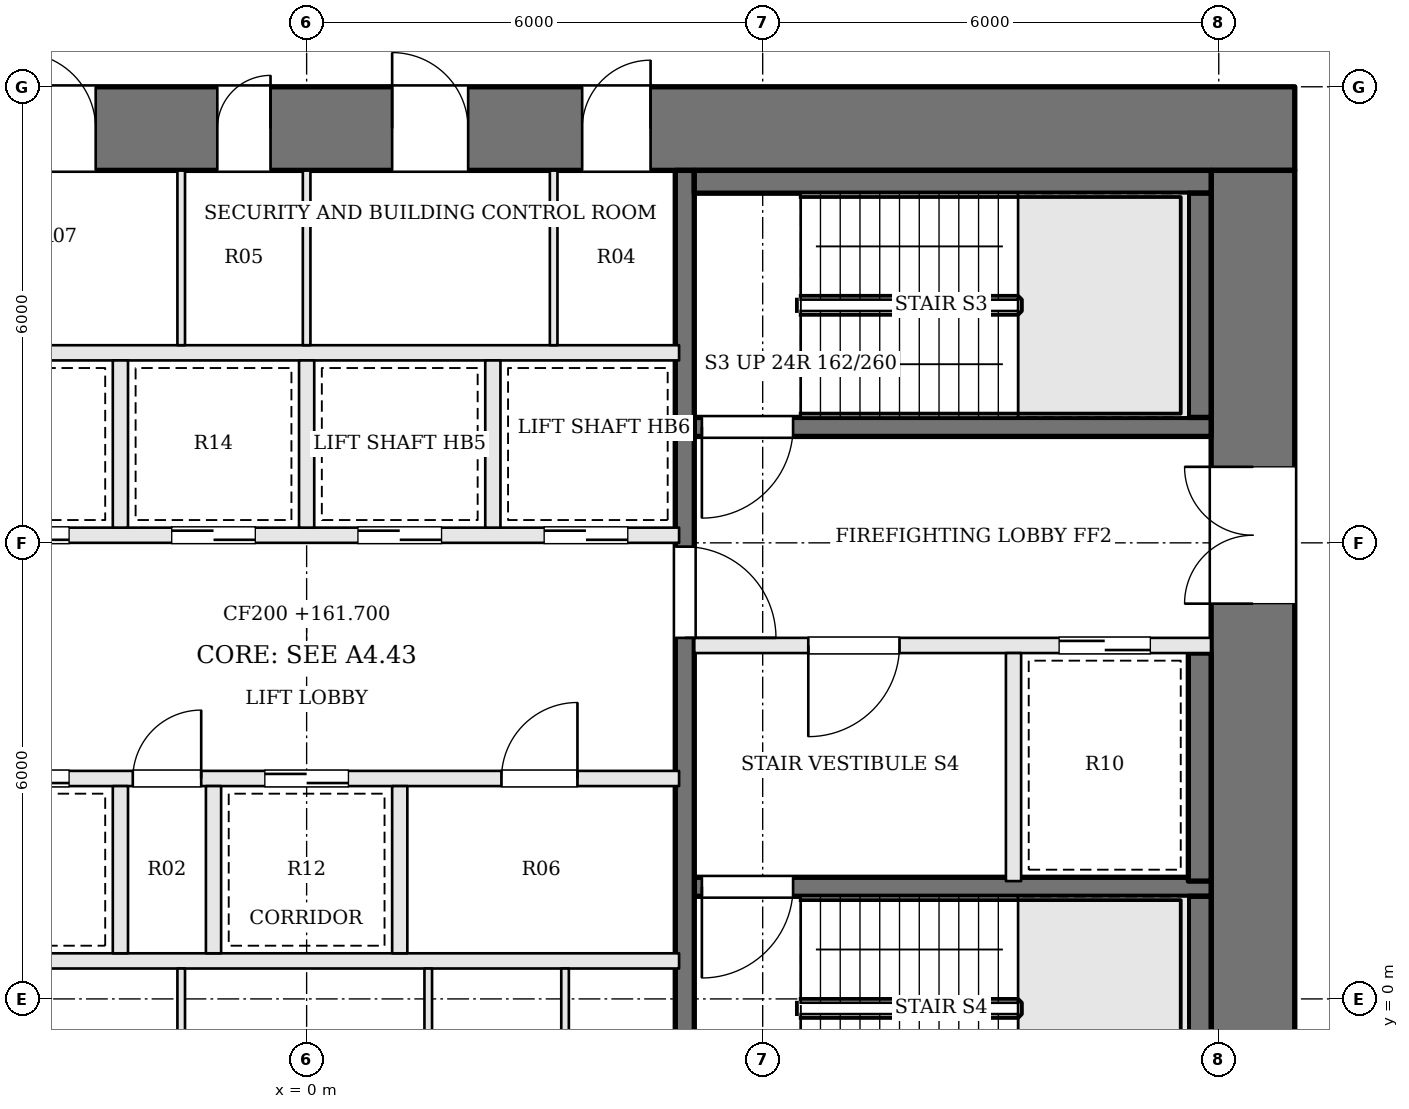
"""IFC4 building model, lengths in metres.
Left out: names, types, materials, properties, quantities, classifications, styles, units other than length and angle.
Written with IfcOpenShell. Run it as: python <this file> out.ifc"""

import sys

from ifc_helpers import new_model, si_unit, direction, frame, frame_2d, origin, place, context, subcontext, project, spatial, rectangle, extrude, element, fill, save


model = new_model("IFC4")
c1 = context("Model", 3, precision=1e-05, world=origin(), true_north=direction((0.0, 1.0)))
c2 = subcontext(c1, "Body", "Model", "MODEL_VIEW")
j1 = project(units=[si_unit("LENGTHUNIT", "METRE"), si_unit("PLANEANGLEUNIT", "RADIAN")], contexts=[c1])
p1 = place(None, origin())
s1 = spatial("IfcSite", under=j1, at=p1, CompositionType="ELEMENT")
p2 = place(p1, origin())
s2 = spatial("IfcBuilding", under=s1, at=p2, CompositionType="ELEMENT")
p3 = place(p2, frame((0.0, 0.0, 161.7)))
s3 = spatial("IfcBuildingStorey", under=s2, at=p3, CompositionType="ELEMENT", Elevation=161.7)
p4 = place(p3, frame((-13.0, 11.45, 0.0), z_axis=(0.0, 0.0, 1.0), x_axis=(1.0, 0.0, 0.0)))
e1 = element("IfcWall", 1, at=p4, inside=s3, PredefinedType="SHEAR", context=c2, shape_type="SweptSolid", body=[
    extrude(rectangle(XDim=26.0, YDim=1.1, at=frame_2d((13.0, 0.0))), origin(), (0.0, 0.0, 1.0), 3.9),
])
p5 = place(p4, frame((9.225, 0.0, 0.0)))
e2 = element("IfcOpeningElement", 2, at=p5, cuts=e1, PredefinedType="OPENING", context=c2, shape_type="SweptSolid", body=[
    extrude(rectangle(XDim=1.0, YDim=2.1, at=frame_2d((0.5, 1.05))), frame((0.0, 0.56, 0.0), z_axis=(0.0, -1.0, 0.0), x_axis=(1.0, 0.0, 0.0)), (0.0, 0.0, 1.0), 1.12),
])
p6 = place(p4, frame((11.825, 0.0, 0.0)))
e3 = element("IfcOpeningElement", 3, at=p6, cuts=e1, PredefinedType="OPENING", context=c2, shape_type="SweptSolid", body=[
    extrude(rectangle(XDim=0.7, YDim=2.1, at=frame_2d((0.35, 1.05))), frame((0.0, 0.56, 0.0), z_axis=(0.0, -1.0, 0.0), x_axis=(1.0, 0.0, 0.0)), (0.0, 0.0, 1.0), 1.12),
])
p7 = place(p4, frame((14.125, 0.0, 0.0)))
e4 = element("IfcOpeningElement", 4, at=p7, cuts=e1, PredefinedType="OPENING", context=c2, shape_type="SweptSolid", body=[
    extrude(rectangle(XDim=1.0, YDim=2.1, at=frame_2d((0.5, 1.05))), frame((0.0, 0.56, 0.0), z_axis=(0.0, -1.0, 0.0), x_axis=(1.0, 0.0, 0.0)), (0.0, 0.0, 1.0), 1.12),
])
p8 = place(p4, frame((16.625, 0.0, 0.0)))
e5 = element("IfcOpeningElement", 5, at=p8, cuts=e1, PredefinedType="OPENING", context=c2, shape_type="SweptSolid", body=[
    extrude(rectangle(XDim=0.9, YDim=2.1, at=frame_2d((0.45, 1.05))), frame((0.0, 0.56, 0.0), z_axis=(0.0, -1.0, 0.0), x_axis=(1.0, 0.0, 0.0)), (0.0, 0.0, 1.0), 1.12),
])
p9 = place(p3, frame((12.45, -1.9, 0.0), z_axis=(0.0, 0.0, 1.0), x_axis=(0.0, 1.0, 0.0)))
e6 = element("IfcWall", 6, at=p9, inside=s3, PredefinedType="SHEAR", context=c2, shape_type="SweptSolid", body=[
    extrude(rectangle(XDim=12.8, YDim=1.1, at=frame_2d((6.4, 0.0))), origin(), (0.0, 0.0, 1.0), 3.9),
])
p10 = place(p9, frame((7.1, 0.0, 0.0)))
e7 = element("IfcOpeningElement", 7, at=p10, cuts=e6, PredefinedType="OPENING", context=c2, shape_type="SweptSolid", body=[
    extrude(rectangle(XDim=1.8, YDim=2.1, at=frame_2d((0.9, 1.05))), frame((0.0, 0.56, 0.0), z_axis=(0.0, -1.0, 0.0), x_axis=(1.0, 0.0, 0.0)), (0.0, 0.0, 1.0), 1.12),
])
p11 = place(p3, frame((11.9, 7.525, 0.0), z_axis=(0.0, 0.0, 1.0), x_axis=(-1.0, 0.0, 0.0)))
e8 = element("IfcWall", 8, at=p11, inside=s3, PredefinedType="SOLIDWALL", context=c2, shape_type="SweptSolid", body=[
    extrude(rectangle(XDim=6.8, YDim=0.25, at=frame_2d((3.4, 0.0))), origin(), (0.0, 0.0, 1.0), 3.7),
])
p12 = place(p11, frame((5.5, 0.0, 0.0)))
e9 = element("IfcOpeningElement", 9, at=p12, cuts=e8, PredefinedType="OPENING", context=c2, shape_type="SweptSolid", body=[
    extrude(rectangle(XDim=1.2, YDim=2.1, at=frame_2d((0.6, 1.05))), frame((0.0, 0.135, 0.0), z_axis=(0.0, -1.0, 0.0), x_axis=(1.0, 0.0, 0.0)), (0.0, 0.0, 1.0), 0.27),
])
p13 = place(p3, frame((11.9, 4.65, 0.0), z_axis=(0.0, 0.0, 1.0), x_axis=(-1.0, 0.0, 0.0)))
e10 = element("IfcWall", 10, at=p13, inside=s3, PredefinedType="SOLIDWALL", context=c2, shape_type="SweptSolid", body=[
    extrude(rectangle(XDim=6.8, YDim=0.2, at=frame_2d((3.4, 0.0))), origin(), (0.0, 0.0, 1.0), 3.7),
])
p14 = place(p13, frame((4.1, 0.0, 0.0)))
e11 = element("IfcOpeningElement", 11, at=p14, cuts=e10, PredefinedType="OPENING", context=c2, shape_type="SweptSolid", body=[
    extrude(rectangle(XDim=1.2, YDim=2.1, at=frame_2d((0.6, 1.05))), frame((0.0, 0.11, 0.0), z_axis=(0.0, -1.0, 0.0), x_axis=(1.0, 0.0, 0.0)), (0.0, 0.0, 1.0), 0.22),
])
p15 = place(p13, frame((0.8, 0.0, 0.0)))
e12 = element("IfcOpeningElement", 12, at=p15, cuts=e10, PredefinedType="OPENING", context=c2, shape_type="SweptSolid", body=[
    extrude(rectangle(XDim=1.2, YDim=2.1, at=frame_2d((0.6, 1.05))), frame((0.0, 0.11, 0.0), z_axis=(0.0, -1.0, 0.0), x_axis=(1.0, 0.0, 0.0)), (0.0, 0.0, 1.0), 0.22),
])
p16 = place(p3, frame((11.9, 1.475, 0.0), z_axis=(0.0, 0.0, 1.0), x_axis=(-1.0, 0.0, 0.0)))
e13 = element("IfcWall", 13, at=p16, inside=s3, PredefinedType="SOLIDWALL", context=c2, shape_type="SweptSolid", body=[
    extrude(rectangle(XDim=6.8, YDim=0.25, at=frame_2d((3.4, 0.0))), origin(), (0.0, 0.0, 1.0), 3.7),
])
p17 = place(p16, frame((5.5, 0.0, 0.0)))
e14 = element("IfcOpeningElement", 14, at=p17, cuts=e13, PredefinedType="OPENING", context=c2, shape_type="SweptSolid", body=[
    extrude(rectangle(XDim=1.2, YDim=2.1, at=frame_2d((0.6, 1.05))), frame((0.0, 0.135, 0.0), z_axis=(0.0, -1.0, 0.0), x_axis=(1.0, 0.0, 0.0)), (0.0, 0.0, 1.0), 0.27),
])
p18 = place(p3, frame((9.3, 4.55, 0.0), z_axis=(0.0, 0.0, 1.0), x_axis=(0.0, -1.0, 0.0)))
e15 = element("IfcWall", 15, at=p18, inside=s3, PredefinedType="SOLIDWALL", context=c2, shape_type="SweptSolid", body=[
    extrude(rectangle(XDim=3.0, YDim=0.2, at=frame_2d((1.5, 0.0))), origin(), (0.0, 0.0, 1.0), 3.7),
])
p19 = place(p3, frame((4.975, 10.9, 0.0), z_axis=(0.0, 0.0, 1.0), x_axis=(0.0, -1.0, 0.0)))
e16 = element("IfcWall", 16, at=p19, inside=s3, PredefinedType="SOLIDWALL", context=c2, shape_type="SweptSolid", body=[
    extrude(rectangle(XDim=12.8, YDim=0.25, at=frame_2d((6.4, 0.0))), origin(), (0.0, 0.0, 1.0), 3.7),
])
p20 = place(p19, frame((4.95, 0.0, 0.0)))
e17 = element("IfcOpeningElement", 17, at=p20, cuts=e16, PredefinedType="OPENING", context=c2, shape_type="SweptSolid", body=[
    extrude(rectangle(XDim=1.2, YDim=2.1, at=frame_2d((0.6, 1.05))), frame((0.0, 0.135, 0.0), z_axis=(0.0, -1.0, 0.0), x_axis=(1.0, 0.0, 0.0)), (0.0, 0.0, 1.0), 0.27),
])
p21 = place(p3, frame((11.9, 10.75, 0.0), z_axis=(0.0, 0.0, 1.0), x_axis=(-1.0, 0.0, 0.0)))
e18 = element("IfcWall", 18, at=p21, inside=s3, PredefinedType="SOLIDWALL", context=c2, shape_type="SweptSolid", body=[
    extrude(rectangle(XDim=6.8, YDim=0.3, at=frame_2d((3.4, 0.0))), origin(), (0.0, 0.0, 1.0), 3.7),
])
p22 = place(p3, frame((11.75, 10.6, 0.0), z_axis=(0.0, 0.0, 1.0), x_axis=(0.0, -1.0, 0.0)))
e19 = element("IfcWall", 19, at=p22, inside=s3, PredefinedType="SOLIDWALL", context=c2, shape_type="SweptSolid", body=[
    extrude(rectangle(XDim=2.95, YDim=0.3, at=frame_2d((1.475, 0.0))), origin(), (0.0, 0.0, 1.0), 3.7),
])
p23 = place(p3, frame((11.75, 4.55, 0.0), z_axis=(0.0, 0.0, 1.0), x_axis=(0.0, -1.0, 0.0)))
e20 = element("IfcWall", 20, at=p23, inside=s3, PredefinedType="SOLIDWALL", context=c2, shape_type="SweptSolid", body=[
    extrude(rectangle(XDim=3.0, YDim=0.3, at=frame_2d((1.5, 0.0))), origin(), (0.0, 0.0, 1.0), 3.7),
])
p24 = place(p3, frame((11.75, 1.35, 0.0), z_axis=(0.0, 0.0, 1.0), x_axis=(0.0, -1.0, 0.0)))
e21 = element("IfcWall", 21, at=p24, inside=s3, PredefinedType="SOLIDWALL", context=c2, shape_type="SweptSolid", body=[
    extrude(rectangle(XDim=2.95, YDim=0.3, at=frame_2d((1.475, 0.0))), origin(), (0.0, 0.0, 1.0), 3.7),
])
p25 = place(p3, frame((-4.9, 0.5, 0.0), z_axis=(0.0, 0.0, 1.0), x_axis=(1.0, 0.0, 0.0)))
e22 = element("IfcWall", 22, at=p25, inside=s3, PredefinedType="SOLIDWALL", context=c2, shape_type="SweptSolid", body=[
    extrude(rectangle(XDim=9.8, YDim=0.2, at=frame_2d((4.9, 0.0))), origin(), (0.0, 0.0, 1.0), 3.7),
])
p26 = place(p3, frame((-4.9, 2.9, 0.0), z_axis=(0.0, 0.0, 1.0), x_axis=(1.0, 0.0, 0.0)))
e23 = element("IfcWall", 23, at=p26, inside=s3, PredefinedType="SOLIDWALL", context=c2, shape_type="SweptSolid", body=[
    extrude(rectangle(XDim=9.8, YDim=0.2, at=frame_2d((4.9, 0.0))), origin(), (0.0, 0.0, 1.0), 3.7),
])
p27 = place(p26, frame((0.675, 0.0, 0.0)))
e24 = element("IfcOpeningElement", 24, at=p27, cuts=e23, PredefinedType="OPENING", context=c2, shape_type="SweptSolid", body=[
    extrude(rectangle(XDim=1.1, YDim=2.1, at=frame_2d((0.55, 1.05))), frame((0.0, 0.11, 0.0), z_axis=(0.0, -1.0, 0.0), x_axis=(1.0, 0.0, 0.0)), (0.0, 0.0, 1.0), 0.22),
])
p28 = place(p26, frame((2.613, 0.0, 0.0)))
e25 = element("IfcOpeningElement", 25, at=p28, cuts=e23, PredefinedType="OPENING", context=c2, shape_type="SweptSolid", body=[
    extrude(rectangle(XDim=0.9, YDim=2.1, at=frame_2d((0.45, 1.05))), frame((0.0, 0.11, 0.0), z_axis=(0.0, -1.0, 0.0), x_axis=(1.0, 0.0, 0.0)), (0.0, 0.0, 1.0), 0.22),
])
p29 = place(p26, frame((4.35, 0.0, 0.0)))
e26 = element("IfcOpeningElement", 26, at=p29, cuts=e23, PredefinedType="OPENING", context=c2, shape_type="SweptSolid", body=[
    extrude(rectangle(XDim=1.1, YDim=2.1, at=frame_2d((0.55, 1.05))), frame((0.0, 0.11, 0.0), z_axis=(0.0, -1.0, 0.0), x_axis=(1.0, 0.0, 0.0)), (0.0, 0.0, 1.0), 0.22),
])
p30 = place(p26, frame((7.463, 0.0, 0.0)))
e27 = element("IfcOpeningElement", 27, at=p30, cuts=e23, PredefinedType="OPENING", context=c2, shape_type="SweptSolid", body=[
    extrude(rectangle(XDim=1.0, YDim=2.1, at=frame_2d((0.5, 1.05))), frame((0.0, 0.11, 0.0), z_axis=(0.0, -1.0, 0.0), x_axis=(1.0, 0.0, 0.0)), (0.0, 0.0, 1.0), 0.22),
])
p31 = place(p3, frame((-4.9, 6.1, 0.0), z_axis=(0.0, 0.0, 1.0), x_axis=(1.0, 0.0, 0.0)))
e28 = element("IfcWall", 28, at=p31, inside=s3, PredefinedType="SOLIDWALL", context=c2, shape_type="SweptSolid", body=[
    extrude(rectangle(XDim=9.8, YDim=0.2, at=frame_2d((4.9, 0.0))), origin(), (0.0, 0.0, 1.0), 3.7),
])
p32 = place(p31, frame((0.675, 0.0, 0.0)))
e29 = element("IfcOpeningElement", 29, at=p32, cuts=e28, PredefinedType="OPENING", context=c2, shape_type="SweptSolid", body=[
    extrude(rectangle(XDim=1.1, YDim=2.1, at=frame_2d((0.55, 1.05))), frame((0.0, 0.11, 0.0), z_axis=(0.0, -1.0, 0.0), x_axis=(1.0, 0.0, 0.0)), (0.0, 0.0, 1.0), 0.22),
])
p33 = place(p31, frame((3.125, 0.0, 0.0)))
e30 = element("IfcOpeningElement", 30, at=p33, cuts=e28, PredefinedType="OPENING", context=c2, shape_type="SweptSolid", body=[
    extrude(rectangle(XDim=1.1, YDim=2.1, at=frame_2d((0.55, 1.05))), frame((0.0, 0.11, 0.0), z_axis=(0.0, -1.0, 0.0), x_axis=(1.0, 0.0, 0.0)), (0.0, 0.0, 1.0), 0.22),
])
p34 = place(p31, frame((5.575, 0.0, 0.0)))
e31 = element("IfcOpeningElement", 31, at=p34, cuts=e28, PredefinedType="OPENING", context=c2, shape_type="SweptSolid", body=[
    extrude(rectangle(XDim=1.1, YDim=2.1, at=frame_2d((0.55, 1.05))), frame((0.0, 0.11, 0.0), z_axis=(0.0, -1.0, 0.0), x_axis=(1.0, 0.0, 0.0)), (0.0, 0.0, 1.0), 0.22),
])
p35 = place(p31, frame((8.025, 0.0, 0.0)))
e32 = element("IfcOpeningElement", 32, at=p35, cuts=e28, PredefinedType="OPENING", context=c2, shape_type="SweptSolid", body=[
    extrude(rectangle(XDim=1.1, YDim=2.1, at=frame_2d((0.55, 1.05))), frame((0.0, 0.11, 0.0), z_axis=(0.0, -1.0, 0.0), x_axis=(1.0, 0.0, 0.0)), (0.0, 0.0, 1.0), 0.22),
])
p36 = place(p3, frame((-4.9, 8.5, 0.0), z_axis=(0.0, 0.0, 1.0), x_axis=(1.0, 0.0, 0.0)))
e33 = element("IfcWall", 33, at=p36, inside=s3, PredefinedType="SOLIDWALL", context=c2, shape_type="SweptSolid", body=[
    extrude(rectangle(XDim=9.8, YDim=0.2, at=frame_2d((4.9, 0.0))), origin(), (0.0, 0.0, 1.0), 3.7),
])
for number, where, z_axis, x_axis in (
    (34, (-2.45, 0.6, 0.0), (0.0, 0.0, 1.0), (0.0, 1.0, 0.0)),
    (35, (-1.225, 0.6, 0.0), (0.0, 0.0, 1.0), (0.0, 1.0, 0.0)),
    (36, (1.225, 0.6, 0.0), (0.0, 0.0, 1.0), (0.0, 1.0, 0.0)),
    (37, (-2.45, 6.2, 0.0), (0.0, 0.0, 1.0), (0.0, 1.0, 0.0)),
    (38, (0.0, 6.2, 0.0), (0.0, 0.0, 1.0), (0.0, 1.0, 0.0)),
    (39, (2.45, 6.2, 0.0), (0.0, 0.0, 1.0), (0.0, 1.0, 0.0)),
):
    element("IfcWall", number, at=place(p3, frame(where, z_axis=z_axis, x_axis=x_axis)), inside=s3, PredefinedType="SOLIDWALL", context=c2, shape_type="SweptSolid", body=[
        extrude(rectangle(XDim=2.2, YDim=0.2, at=frame_2d((1.1, 0.0))), origin(), (0.0, 0.0, 1.0), 3.7),
    ])
for number, where, z_axis, x_axis in (
    (40, (-1.65, -1.9, 0.0), (0.0, 0.0, 1.0), (0.0, 1.0, 0.0)),
    (41, (1.6, -1.9, 0.0), (0.0, 0.0, 1.0), (0.0, 1.0, 0.0)),
    (42, (3.4, -1.9, 0.0), (0.0, 0.0, 1.0), (0.0, 1.0, 0.0)),
    (43, (-1.65, 8.6, 0.0), (0.0, 0.0, 1.0), (0.0, 1.0, 0.0)),
    (44, (0.0, 8.6, 0.0), (0.0, 0.0, 1.0), (0.0, 1.0, 0.0)),
    (45, (3.25, 8.6, 0.0), (0.0, 0.0, 1.0), (0.0, 1.0, 0.0)),
):
    element("IfcWall", number, at=place(p3, frame(where, z_axis=z_axis, x_axis=x_axis)), inside=s3, PredefinedType="PARTITIONING", context=c2, shape_type="SweptSolid", body=[
        extrude(rectangle(XDim=2.3, YDim=0.1, at=frame_2d((1.15, 0.0))), origin(), (0.0, 0.0, 1.0), 3.7),
    ])
p37 = place(p10, origin())
e46 = element("IfcDoor", 46, at=p37, inside=s3, OperationType="DOUBLE_DOOR_SINGLE_SWING", PredefinedType="DOOR", context=c2, shape_type="SweptSolid", body=[
    extrude(rectangle(XDim=1.8, YDim=2.1, at=frame_2d((0.9, 1.05))), frame((0.0, 0.025, 0.0), z_axis=(0.0, -1.0, 0.0), x_axis=(1.0, 0.0, 0.0)), (0.0, 0.0, 1.0), 0.05),
])
fill(e7, e46)
p38 = place(p20, origin())
e47 = element("IfcDoor", 47, at=p38, inside=s3, OperationType="SINGLE_SWING_RIGHT", PredefinedType="DOOR", context=c2, shape_type="SweptSolid", body=[
    extrude(rectangle(XDim=1.2, YDim=2.1, at=frame_2d((0.6, 1.05))), frame((0.0, 0.025, 0.0), z_axis=(0.0, -1.0, 0.0), x_axis=(1.0, 0.0, 0.0)), (0.0, 0.0, 1.0), 0.05),
])
fill(e17, e47)
p39 = place(p14, origin())
e48 = element("IfcDoor", 48, at=p39, inside=s3, OperationType="SINGLE_SWING_RIGHT", PredefinedType="DOOR", context=c2, shape_type="SweptSolid", body=[
    extrude(rectangle(XDim=1.2, YDim=2.1, at=frame_2d((0.6, 1.05))), frame((0.0, 0.025, 0.0), z_axis=(0.0, -1.0, 0.0), x_axis=(1.0, 0.0, 0.0)), (0.0, 0.0, 1.0), 0.05),
])
fill(e11, e48)
p40 = place(p12, origin())
e49 = element("IfcDoor", 49, at=p40, inside=s3, OperationType="SINGLE_SWING_RIGHT", PredefinedType="DOOR", context=c2, shape_type="SweptSolid", body=[
    extrude(rectangle(XDim=1.2, YDim=2.1, at=frame_2d((0.6, 1.05))), frame((0.0, 0.025, 0.0), z_axis=(0.0, -1.0, 0.0), x_axis=(1.0, 0.0, 0.0)), (0.0, 0.0, 1.0), 0.05),
])
fill(e9, e49)
p41 = place(p17, origin())
e50 = element("IfcDoor", 50, at=p41, inside=s3, OperationType="SINGLE_SWING_RIGHT", PredefinedType="DOOR", context=c2, shape_type="SweptSolid", body=[
    extrude(rectangle(XDim=1.2, YDim=2.1, at=frame_2d((0.6, 1.05))), frame((0.0, 0.025, 0.0), z_axis=(0.0, -1.0, 0.0), x_axis=(1.0, 0.0, 0.0)), (0.0, 0.0, 1.0), 0.05),
])
fill(e14, e50)
p42 = place(p15, origin())
e51 = element("IfcDoor", 51, at=p42, inside=s3, OperationType="SLIDING_TO_RIGHT", PredefinedType="DOOR", context=c2, shape_type="SweptSolid", body=[
    extrude(rectangle(XDim=1.2, YDim=2.1, at=frame_2d((0.6, 1.05))), frame((0.0, 0.025, 0.0), z_axis=(0.0, -1.0, 0.0), x_axis=(1.0, 0.0, 0.0)), (0.0, 0.0, 1.0), 0.05),
])
fill(e12, e51)
p43 = place(p27, origin())
e52 = element("IfcDoor", 52, at=p43, inside=s3, OperationType="SLIDING_TO_RIGHT", PredefinedType="DOOR", context=c2, shape_type="SweptSolid", body=[
    extrude(rectangle(XDim=1.1, YDim=2.1, at=frame_2d((0.55, 1.05))), frame((0.0, 0.025, 0.0), z_axis=(0.0, -1.0, 0.0), x_axis=(1.0, 0.0, 0.0)), (0.0, 0.0, 1.0), 0.05),
])
fill(e24, e52)
p44 = place(p28, origin())
e53 = element("IfcDoor", 53, at=p44, inside=s3, OperationType="SINGLE_SWING_RIGHT", PredefinedType="DOOR", context=c2, shape_type="SweptSolid", body=[
    extrude(rectangle(XDim=0.9, YDim=2.1, at=frame_2d((0.45, 1.05))), frame((0.0, 0.025, 0.0), z_axis=(0.0, -1.0, 0.0), x_axis=(1.0, 0.0, 0.0)), (0.0, 0.0, 1.0), 0.05),
])
fill(e25, e53)
p45 = place(p29, origin())
e54 = element("IfcDoor", 54, at=p45, inside=s3, OperationType="SLIDING_TO_LEFT", PredefinedType="DOOR", context=c2, shape_type="SweptSolid", body=[
    extrude(rectangle(XDim=1.1, YDim=2.1, at=frame_2d((0.55, 1.05))), frame((0.0, 0.025, 0.0), z_axis=(0.0, -1.0, 0.0), x_axis=(1.0, 0.0, 0.0)), (0.0, 0.0, 1.0), 0.05),
])
fill(e26, e54)
p46 = place(p30, origin())
e55 = element("IfcDoor", 55, at=p46, inside=s3, OperationType="SINGLE_SWING_RIGHT", PredefinedType="DOOR", context=c2, shape_type="SweptSolid", body=[
    extrude(rectangle(XDim=1.0, YDim=2.1, at=frame_2d((0.5, 1.05))), frame((0.0, 0.025, 0.0), z_axis=(0.0, -1.0, 0.0), x_axis=(1.0, 0.0, 0.0)), (0.0, 0.0, 1.0), 0.05),
])
fill(e27, e55)
p47 = place(p32, origin())
e56 = element("IfcDoor", 56, at=p47, inside=s3, OperationType="SLIDING_TO_RIGHT", PredefinedType="DOOR", context=c2, shape_type="SweptSolid", body=[
    extrude(rectangle(XDim=1.1, YDim=2.1, at=frame_2d((0.55, 1.05))), frame((0.0, 0.025, 0.0), z_axis=(0.0, -1.0, 0.0), x_axis=(1.0, 0.0, 0.0)), (0.0, 0.0, 1.0), 0.05),
])
fill(e29, e56)
p48 = place(p33, origin())
e57 = element("IfcDoor", 57, at=p48, inside=s3, OperationType="SLIDING_TO_LEFT", PredefinedType="DOOR", context=c2, shape_type="SweptSolid", body=[
    extrude(rectangle(XDim=1.1, YDim=2.1, at=frame_2d((0.55, 1.05))), frame((0.0, 0.025, 0.0), z_axis=(0.0, -1.0, 0.0), x_axis=(1.0, 0.0, 0.0)), (0.0, 0.0, 1.0), 0.05),
])
fill(e30, e57)
p49 = place(p34, origin())
e58 = element("IfcDoor", 58, at=p49, inside=s3, OperationType="SLIDING_TO_RIGHT", PredefinedType="DOOR", context=c2, shape_type="SweptSolid", body=[
    extrude(rectangle(XDim=1.1, YDim=2.1, at=frame_2d((0.55, 1.05))), frame((0.0, 0.025, 0.0), z_axis=(0.0, -1.0, 0.0), x_axis=(1.0, 0.0, 0.0)), (0.0, 0.0, 1.0), 0.05),
])
fill(e31, e58)
p50 = place(p35, origin())
e59 = element("IfcDoor", 59, at=p50, inside=s3, OperationType="SLIDING_TO_LEFT", PredefinedType="DOOR", context=c2, shape_type="SweptSolid", body=[
    extrude(rectangle(XDim=1.1, YDim=2.1, at=frame_2d((0.55, 1.05))), frame((0.0, 0.025, 0.0), z_axis=(0.0, -1.0, 0.0), x_axis=(1.0, 0.0, 0.0)), (0.0, 0.0, 1.0), 0.05),
])
fill(e32, e59)
p51 = place(p5, origin())
e60 = element("IfcDoor", 60, at=p51, inside=s3, OperationType="SINGLE_SWING_LEFT", PredefinedType="DOOR", context=c2, shape_type="SweptSolid", body=[
    extrude(rectangle(XDim=1.0, YDim=2.1, at=frame_2d((0.5, 1.05))), frame((0.0, 0.025, 0.0), z_axis=(0.0, -1.0, 0.0), x_axis=(1.0, 0.0, 0.0)), (0.0, 0.0, 1.0), 0.05),
])
fill(e2, e60)
p52 = place(p6, origin())
e61 = element("IfcDoor", 61, at=p52, inside=s3, OperationType="SINGLE_SWING_RIGHT", PredefinedType="DOOR", context=c2, shape_type="SweptSolid", body=[
    extrude(rectangle(XDim=0.7, YDim=2.1, at=frame_2d((0.35, 1.05))), frame((0.0, 0.025, 0.0), z_axis=(0.0, -1.0, 0.0), x_axis=(1.0, 0.0, 0.0)), (0.0, 0.0, 1.0), 0.05),
])
fill(e3, e61)
p53 = place(p7, origin())
e62 = element("IfcDoor", 62, at=p53, inside=s3, OperationType="SINGLE_SWING_LEFT", PredefinedType="DOOR", context=c2, shape_type="SweptSolid", body=[
    extrude(rectangle(XDim=1.0, YDim=2.1, at=frame_2d((0.5, 1.05))), frame((0.0, 0.025, 0.0), z_axis=(0.0, -1.0, 0.0), x_axis=(1.0, 0.0, 0.0)), (0.0, 0.0, 1.0), 0.05),
])
fill(e4, e62)
p54 = place(p8, origin())
e63 = element("IfcDoor", 63, at=p54, inside=s3, OperationType="SINGLE_SWING_RIGHT", PredefinedType="DOOR", context=c2, shape_type="SweptSolid", body=[
    extrude(rectangle(XDim=0.9, YDim=2.1, at=frame_2d((0.45, 1.05))), frame((0.0, 0.025, 0.0), z_axis=(0.0, -1.0, 0.0), x_axis=(1.0, 0.0, 0.0)), (0.0, 0.0, 1.0), 0.05),
])
fill(e5, e63)
save(model, sys.argv[1])
